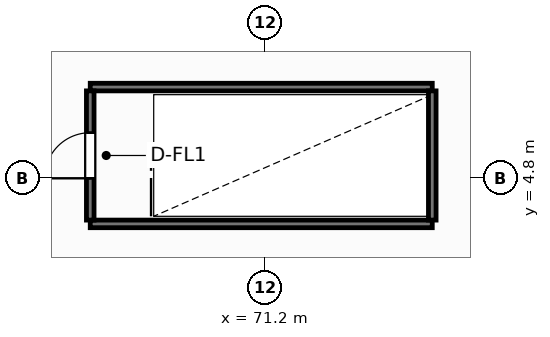
"""IFC4 building model, lengths in metres.
Left out: names, types, materials, properties, quantities, classifications, styles, units other than length and angle.
Written with IfcOpenShell. Run it as: python <this file> out.ifc"""

import sys

from ifc_helpers import new_model, si_unit, direction, frame, frame_2d, origin, place, context, subcontext, project, spatial, rectangle, extrude, element, fill, save


model = new_model("IFC4")
c1 = context("Model", 3, precision=1e-05, world=origin(), true_north=direction((0.0, 1.0)))
c2 = subcontext(c1, "Body", "Model", "MODEL_VIEW")
j1 = project(units=[si_unit("LENGTHUNIT", "METRE"), si_unit("PLANEANGLEUNIT", "RADIAN")], contexts=[c1])
p1 = place(None, origin())
s1 = spatial("IfcSite", under=j1, at=p1, CompositionType="ELEMENT")
p2 = place(p1, origin())
s2 = spatial("IfcBuilding", under=s1, at=p2, CompositionType="ELEMENT")
p3 = place(p2, origin())
s3 = spatial("IfcBuildingStorey", under=s2, at=p3, CompositionType="ELEMENT", Elevation=0.0)
for number, where, z_axis, x_axis in (
    (1, (66.6, 3.6, 0.0), (0.0, 0.0, 1.0), (1.0, 0.0, 0.0)),
    (2, (75.6, 7.2, 0.0), (0.0, 0.0, 1.0), (-1.0, 0.0, 0.0)),
):
    element("IfcWall", number, at=place(p3, frame(where, z_axis=z_axis, x_axis=x_axis)), inside=s3, PredefinedType="SHEAR", context=c2, shape_type="SweptSolid", body=[
        extrude(rectangle(XDim=9.0, YDim=0.2, at=frame_2d((4.5, 0.0))), origin(), (0.0, 0.0, 1.0), 6.6),
    ])
p4 = place(p3, frame((66.6, 3.7, 0.0), z_axis=(0.0, 0.0, 1.0), x_axis=(0.0, 1.0, 0.0)))
e3 = element("IfcWall", 3, at=p4, inside=s3, PredefinedType="SHEAR", context=c2, shape_type="SweptSolid", body=[
    extrude(rectangle(XDim=3.4, YDim=0.2, at=frame_2d((1.7, 0.0))), origin(), (0.0, 0.0, 1.0), 6.6),
])
p5 = place(p4, frame((1.1, 0.0, 0.0)))
e4 = element("IfcOpeningElement", 4, at=p5, cuts=e3, PredefinedType="OPENING", context=c2, shape_type="SweptSolid", body=[
    extrude(rectangle(XDim=1.2, YDim=2.15, at=frame_2d((0.6, 1.075))), frame((0.0, 0.11, 0.0), z_axis=(0.0, -1.0, 0.0), x_axis=(1.0, 0.0, 0.0)), (0.0, 0.0, 1.0), 0.22),
])
p6 = place(p3, frame((75.6, 3.7, 0.0), z_axis=(0.0, 0.0, 1.0), x_axis=(0.0, 1.0, 0.0)))
e5 = element("IfcWall", 5, at=p6, inside=s3, PredefinedType="SHEAR", context=c2, shape_type="SweptSolid", body=[
    extrude(rectangle(XDim=3.4, YDim=0.2, at=frame_2d((1.7, 0.0))), origin(), (0.0, 0.0, 1.0), 6.6),
])
p7 = place(p5, origin())
e6 = element("IfcDoor", 6, at=p7, inside=s3, OperationType="SINGLE_SWING_LEFT", PredefinedType="DOOR", context=c2, shape_type="SweptSolid", body=[
    extrude(rectangle(XDim=1.2, YDim=2.15, at=frame_2d((0.6, 1.075))), frame((0.0, 0.025, 0.0), z_axis=(0.0, -1.0, 0.0), x_axis=(1.0, 0.0, 0.0)), (0.0, 0.0, 1.0), 0.05),
])
fill(e4, e6)
save(model, sys.argv[1])
